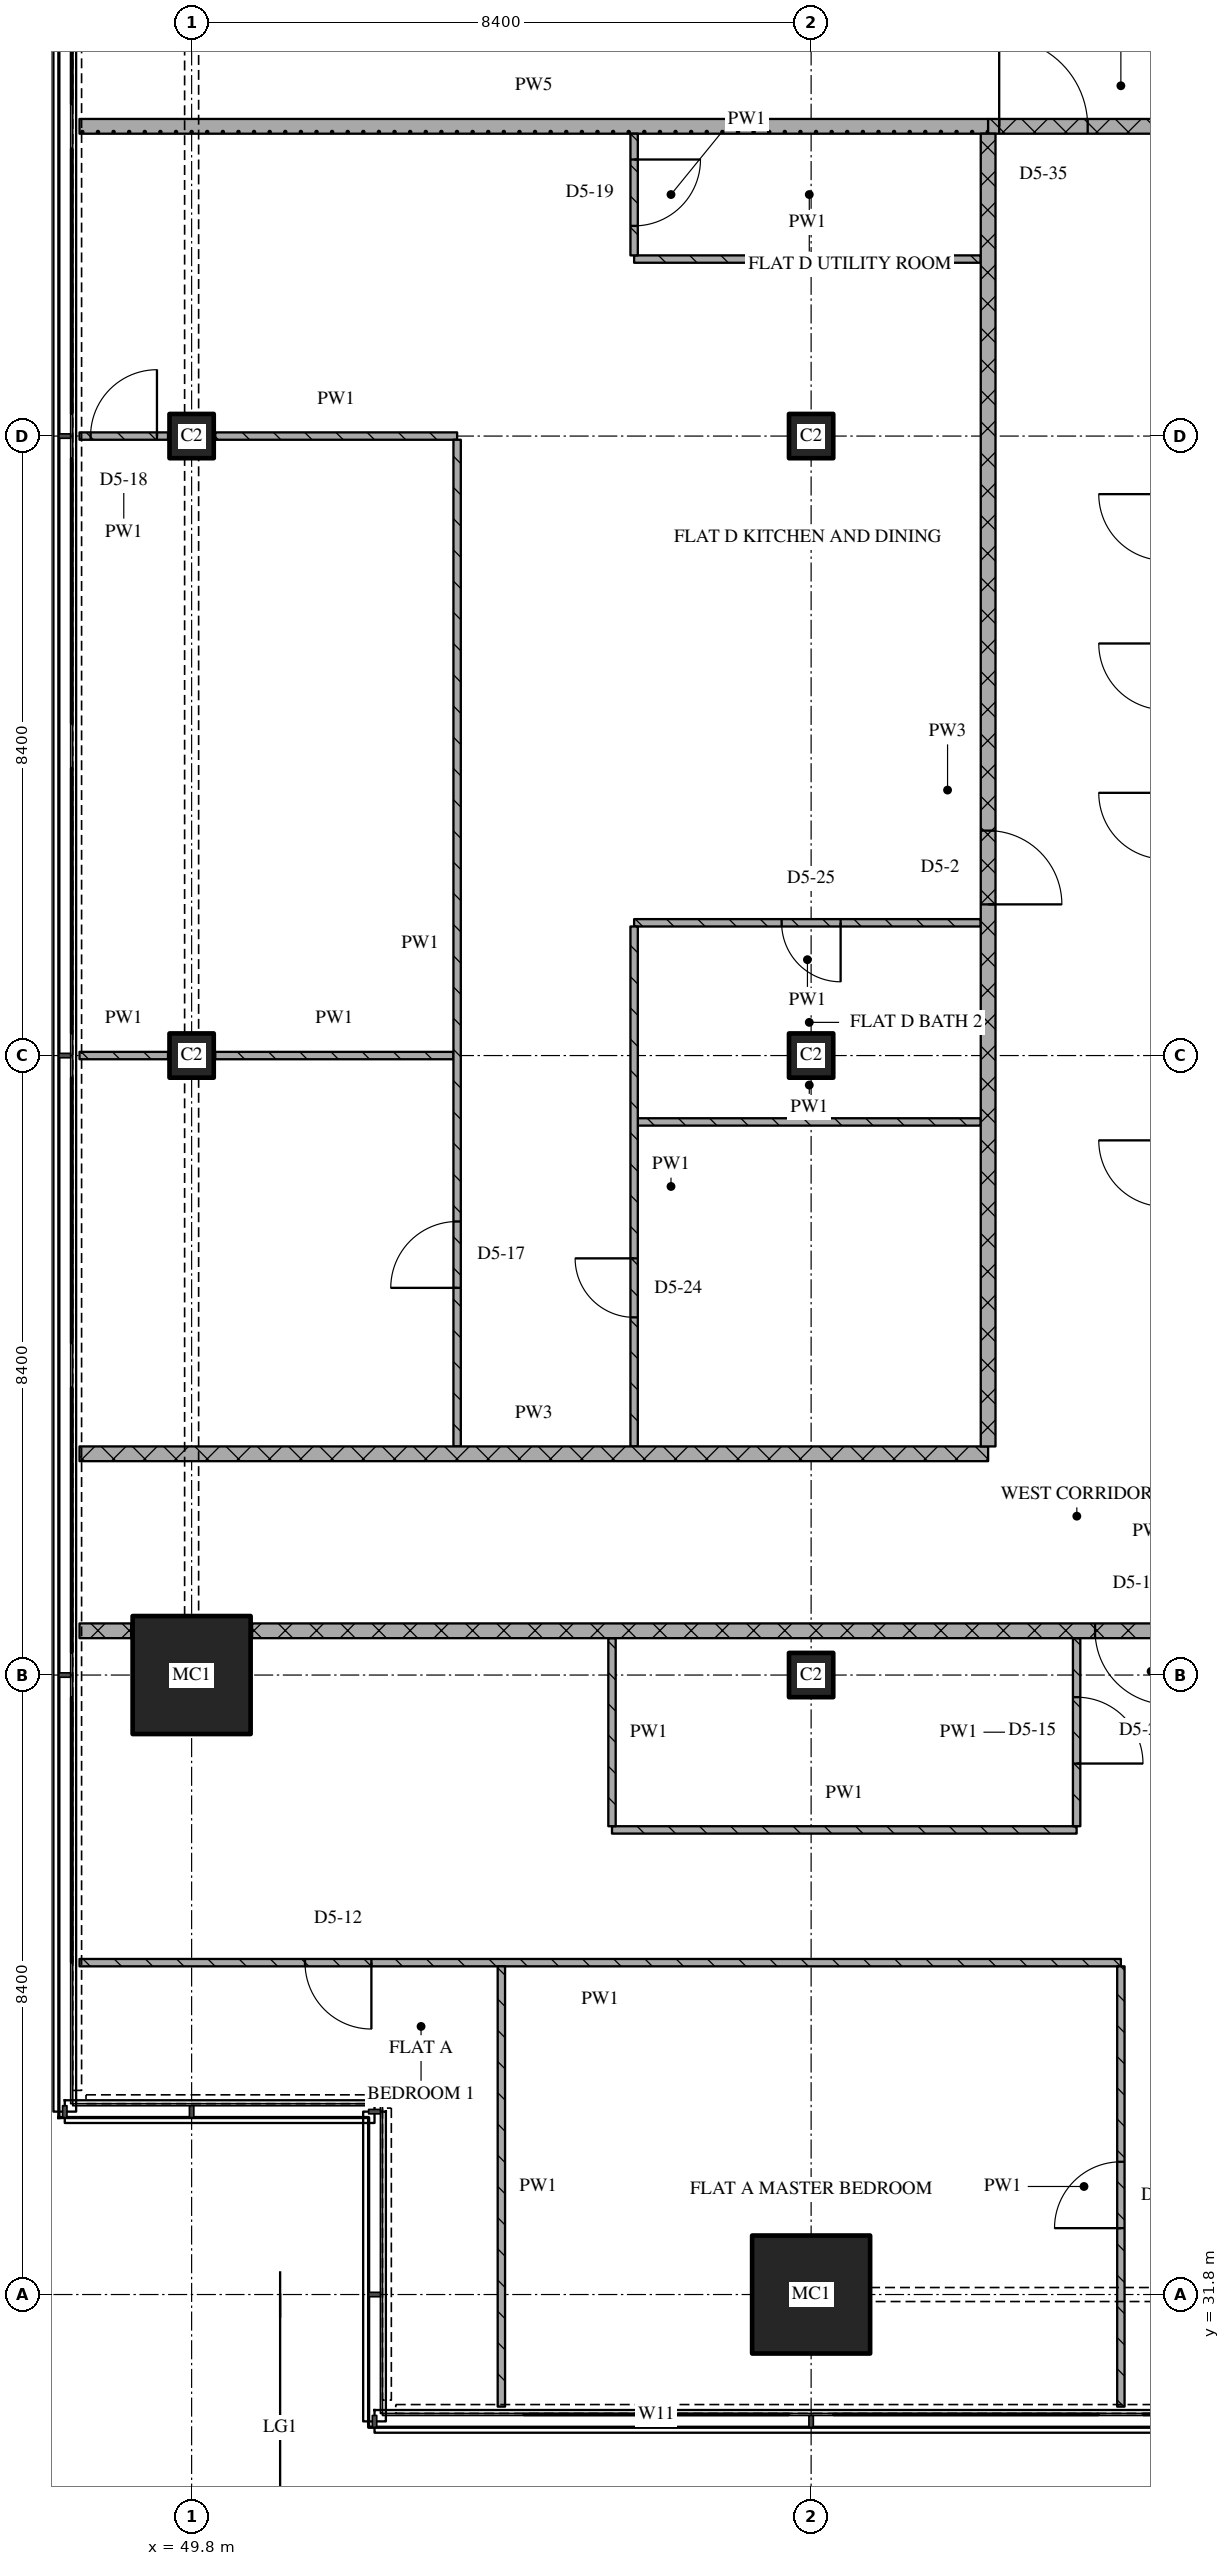
"""IFC4 building model, lengths in metres.
Left out: names, types, materials, properties, quantities, classifications, styles, units other than length and angle.
Written with IfcOpenShell. Run it as: python <this file> out.ifc"""

import sys

from ifc_helpers import new_model, si_unit, direction, frame, frame_2d, origin, origin_2d, place, context, subcontext, project, spatial, rectangle, extrude, element, fill, save


model = new_model("IFC4")
c1 = context("Model", 3, precision=1e-05, world=origin(), true_north=direction((0.0, 1.0)))
c2 = subcontext(c1, "Body", "Model", "MODEL_VIEW")
j1 = project(units=[si_unit("LENGTHUNIT", "METRE"), si_unit("PLANEANGLEUNIT", "RADIAN")], contexts=[c1])
p1 = place(None, origin())
s1 = spatial("IfcSite", under=j1, at=p1, CompositionType="ELEMENT")
p2 = place(p1, origin())
s2 = spatial("IfcBuilding", under=s1, at=p2, CompositionType="ELEMENT")
p3 = place(p2, frame((0.0, 0.0, 248.7)))
s3 = spatial("IfcBuildingStorey", under=s2, at=p3, CompositionType="ELEMENT", Elevation=248.7)
p4 = place(p3, frame((49.8, 40.2, 0.0), z_axis=(0.0, 0.0, 1.0), x_axis=(1.0, 0.0, 0.0)))
e1 = element("IfcColumn", 1, at=p4, inside=s3, PredefinedType="COLUMN", context=c2, shape_type="SweptSolid", body=[
    extrude(rectangle(XDim=1.6, YDim=1.6, at=origin_2d()), origin(), (0.0, 0.0, 1.0), 3.6),
])
for number, where, z_axis, x_axis in (
    (2, (49.8, 48.6, 0.0), (0.0, 0.0, 1.0), (1.0, 0.0, 0.0)),
    (3, (49.8, 57.0, 0.0), (0.0, 0.0, 1.0), (1.0, 0.0, 0.0)),
):
    element("IfcColumn", number, at=place(p3, frame(where, z_axis=z_axis, x_axis=x_axis)), inside=s3, PredefinedType="COLUMN", context=c2, shape_type="SweptSolid", body=[
        extrude(rectangle(XDim=0.6, YDim=0.6, at=origin_2d()), origin(), (0.0, 0.0, 1.0), 3.6),
    ])
p5 = place(p3, frame((58.2, 31.8, 0.0), z_axis=(0.0, 0.0, 1.0), x_axis=(1.0, 0.0, 0.0)))
e4 = element("IfcColumn", 4, at=p5, inside=s3, PredefinedType="COLUMN", context=c2, shape_type="SweptSolid", body=[
    extrude(rectangle(XDim=1.6, YDim=1.6, at=origin_2d()), origin(), (0.0, 0.0, 1.0), 3.6),
])
for number, where, z_axis, x_axis in (
    (5, (58.2, 40.2, 0.0), (0.0, 0.0, 1.0), (1.0, 0.0, 0.0)),
    (6, (58.2, 48.6, 0.0), (0.0, 0.0, 1.0), (1.0, 0.0, 0.0)),
    (7, (58.2, 57.0, 0.0), (0.0, 0.0, 1.0), (1.0, 0.0, 0.0)),
):
    element("IfcColumn", number, at=place(p3, frame(where, z_axis=z_axis, x_axis=x_axis)), inside=s3, PredefinedType="COLUMN", context=c2, shape_type="SweptSolid", body=[
        extrude(rectangle(XDim=0.6, YDim=0.6, at=origin_2d()), origin(), (0.0, 0.0, 1.0), 3.6),
    ])
p6 = place(p3, frame((62.4, 36.3, 0.0), z_axis=(0.0, 0.0, 1.0), x_axis=(-1.0, 0.0, 0.0)))
e8 = element("IfcWall", 8, at=p6, inside=s3, PredefinedType="PARTITIONING", context=c2, shape_type="SweptSolid", body=[
    extrude(rectangle(XDim=14.12, YDim=0.1, at=frame_2d((7.06, 0.0))), origin(), (0.0, 0.0, 1.0), 3.3),
])
p7 = place(p6, frame((10.163, 0.0, 0.0)))
e9 = element("IfcOpeningElement", 9, at=p7, cuts=e8, PredefinedType="OPENING", context=c2, shape_type="SweptSolid", body=[
    extrude(rectangle(XDim=0.9, YDim=2.1, at=frame_2d((0.45, 1.05))), frame((0.0, 0.06, 0.0), z_axis=(0.0, -1.0, 0.0), x_axis=(1.0, 0.0, 0.0)), (0.0, 0.0, 1.0), 0.12),
])
p8 = place(p3, frame((55.5, 38.1, 0.0), z_axis=(0.0, 0.0, 1.0), x_axis=(1.0, 0.0, 0.0)))
e10 = element("IfcWall", 10, at=p8, inside=s3, PredefinedType="PARTITIONING", context=c2, shape_type="SweptSolid", body=[
    extrude(rectangle(XDim=6.3, YDim=0.1, at=frame_2d((3.15, 0.0))), origin(), (0.0, 0.0, 1.0), 3.3),
])
p9 = place(p3, frame((48.28, 40.8, 0.0), z_axis=(0.0, 0.0, 1.0), x_axis=(1.0, 0.0, 0.0)))
e11 = element("IfcWall", 11, at=p9, inside=s3, PredefinedType="PARTITIONING", context=c2, shape_type="SweptSolid", body=[
    extrude(rectangle(XDim=0.7, YDim=0.2, at=frame_2d((0.35, 0.0))), origin(), (0.0, 0.0, 1.0), 3.3),
])
p10 = place(p3, frame((75.0, 40.8, 0.0), z_axis=(0.0, 0.0, 1.0), x_axis=(-1.0, 0.0, 0.0)))
e12 = element("IfcWall", 12, at=p10, inside=s3, PredefinedType="PARTITIONING", context=c2, shape_type="SweptSolid", body=[
    extrude(rectangle(XDim=24.38, YDim=0.2, at=frame_2d((12.19, 0.0))), origin(), (0.0, 0.0, 1.0), 3.3),
])
p11 = place(p10, frame((11.95, 0.0, 0.0)))
e13 = element("IfcOpeningElement", 13, at=p11, cuts=e12, PredefinedType="OPENING", context=c2, shape_type="SweptSolid", body=[
    extrude(rectangle(XDim=1.0, YDim=2.1, at=frame_2d((0.5, 1.05))), frame((0.0, 0.11, 0.0), z_axis=(0.0, -1.0, 0.0), x_axis=(1.0, 0.0, 0.0)), (0.0, 0.0, 1.0), 0.22),
])
p12 = place(p3, frame((48.28, 43.2, 0.0), z_axis=(0.0, 0.0, 1.0), x_axis=(1.0, 0.0, 0.0)))
e14 = element("IfcWall", 14, at=p12, inside=s3, PredefinedType="PARTITIONING", context=c2, shape_type="SweptSolid", body=[
    extrude(rectangle(XDim=12.32, YDim=0.2, at=frame_2d((6.16, 0.0))), origin(), (0.0, 0.0, 1.0), 3.3),
])
p13 = place(p3, frame((55.85, 47.7, 0.0), z_axis=(0.0, 0.0, 1.0), x_axis=(1.0, 0.0, 0.0)))
e15 = element("IfcWall", 15, at=p13, inside=s3, PredefinedType="PARTITIONING", context=c2, shape_type="SweptSolid", body=[
    extrude(rectangle(XDim=4.65, YDim=0.1, at=frame_2d((2.325, 0.0))), origin(), (0.0, 0.0, 1.0), 3.3),
])
p14 = place(p3, frame((48.28, 48.6, 0.0), z_axis=(0.0, 0.0, 1.0), x_axis=(1.0, 0.0, 0.0)))
e16 = element("IfcWall", 16, at=p14, inside=s3, PredefinedType="PARTITIONING", context=c2, shape_type="SweptSolid", body=[
    extrude(rectangle(XDim=1.2, YDim=0.1, at=frame_2d((0.6, 0.0))), origin(), (0.0, 0.0, 1.0), 3.3),
])
p15 = place(p3, frame((50.12, 48.6, 0.0), z_axis=(0.0, 0.0, 1.0), x_axis=(1.0, 0.0, 0.0)))
e17 = element("IfcWall", 17, at=p15, inside=s3, PredefinedType="PARTITIONING", context=c2, shape_type="SweptSolid", body=[
    extrude(rectangle(XDim=3.23, YDim=0.1, at=frame_2d((1.615, 0.0))), origin(), (0.0, 0.0, 1.0), 3.3),
])
p16 = place(p3, frame((60.5, 50.4, 0.0), z_axis=(0.0, 0.0, 1.0), x_axis=(-1.0, 0.0, 0.0)))
e18 = element("IfcWall", 18, at=p16, inside=s3, PredefinedType="PARTITIONING", context=c2, shape_type="SweptSolid", body=[
    extrude(rectangle(XDim=4.7, YDim=0.1, at=frame_2d((2.35, 0.0))), origin(), (0.0, 0.0, 1.0), 3.3),
])
p17 = place(p16, frame((1.9, 0.0, 0.0)))
e19 = element("IfcOpeningElement", 19, at=p17, cuts=e18, PredefinedType="OPENING", context=c2, shape_type="SweptSolid", body=[
    extrude(rectangle(XDim=0.8, YDim=2.1, at=frame_2d((0.4, 1.05))), frame((0.0, 0.06, 0.0), z_axis=(0.0, -1.0, 0.0), x_axis=(1.0, 0.0, 0.0)), (0.0, 0.0, 1.0), 0.12),
])
p18 = place(p3, frame((49.48, 57.0, 0.0), z_axis=(0.0, 0.0, 1.0), x_axis=(-1.0, 0.0, 0.0)))
e20 = element("IfcWall", 20, at=p18, inside=s3, PredefinedType="PARTITIONING", context=c2, shape_type="SweptSolid", body=[
    extrude(rectangle(XDim=1.2, YDim=0.1, at=frame_2d((0.6, 0.0))), origin(), (0.0, 0.0, 1.0), 3.3),
])
p19 = place(p18, frame((0.15, 0.0, 0.0)))
e21 = element("IfcOpeningElement", 21, at=p19, cuts=e20, PredefinedType="OPENING", context=c2, shape_type="SweptSolid", body=[
    extrude(rectangle(XDim=0.9, YDim=2.1, at=frame_2d((0.45, 1.05))), frame((0.0, 0.06, 0.0), z_axis=(0.0, -1.0, 0.0), x_axis=(1.0, 0.0, 0.0)), (0.0, 0.0, 1.0), 0.12),
])
p20 = place(p3, frame((50.12, 57.0, 0.0), z_axis=(0.0, 0.0, 1.0), x_axis=(1.0, 0.0, 0.0)))
e22 = element("IfcWall", 22, at=p20, inside=s3, PredefinedType="PARTITIONING", context=c2, shape_type="SweptSolid", body=[
    extrude(rectangle(XDim=3.28, YDim=0.1, at=frame_2d((1.64, 0.0))), origin(), (0.0, 0.0, 1.0), 3.3),
])
p21 = place(p3, frame((55.8, 59.4, 0.0), z_axis=(0.0, 0.0, 1.0), x_axis=(1.0, 0.0, 0.0)))
e23 = element("IfcWall", 23, at=p21, inside=s3, PredefinedType="PARTITIONING", context=c2, shape_type="SweptSolid", body=[
    extrude(rectangle(XDim=4.7, YDim=0.1, at=frame_2d((2.35, 0.0))), origin(), (0.0, 0.0, 1.0), 3.3),
])
p22 = place(p3, frame((60.6, 61.2, 0.0), z_axis=(0.0, 0.0, 1.0), x_axis=(1.0, 0.0, 0.0)))
e24 = element("IfcWall", 24, at=p22, inside=s3, PredefinedType="PARTITIONING", context=c2, shape_type="SweptSolid", body=[
    extrude(rectangle(XDim=3.6, YDim=0.2, at=frame_2d((1.8, 0.0))), origin(), (0.0, 0.0, 1.0), 3.3),
])
p23 = place(p22, frame((0.15, 0.0, 0.0)))
e25 = element("IfcOpeningElement", 25, at=p23, cuts=e24, PredefinedType="OPENING", context=c2, shape_type="SweptSolid", body=[
    extrude(rectangle(XDim=1.2, YDim=2.1, at=frame_2d((0.6, 1.05))), frame((0.0, 0.11, 0.0), z_axis=(0.0, -1.0, 0.0), x_axis=(1.0, 0.0, 0.0)), (0.0, 0.0, 1.0), 0.22),
])
p24 = place(p3, frame((48.28, 61.2, 0.0), z_axis=(0.0, 0.0, 1.0), x_axis=(1.0, 0.0, 0.0)))
e26 = element("IfcWall", 26, at=p24, inside=s3, PredefinedType="PARTITIONING", context=c2, shape_type="SweptSolid", body=[
    extrude(rectangle(XDim=12.32, YDim=0.2, at=frame_2d((6.16, 0.0))), origin(), (0.0, 0.0, 1.0), 3.3),
])
p25 = place(p3, frame((53.4, 43.3, 0.0), z_axis=(0.0, 0.0, 1.0), x_axis=(0.0, 1.0, 0.0)))
e27 = element("IfcWall", 27, at=p25, inside=s3, PredefinedType="PARTITIONING", context=c2, shape_type="SweptSolid", body=[
    extrude(rectangle(XDim=13.65, YDim=0.1, at=frame_2d((6.825, 0.0))), origin(), (0.0, 0.0, 1.0), 3.3),
])
p26 = place(p25, frame((2.15, 0.0, 0.0)))
e28 = element("IfcOpeningElement", 28, at=p26, cuts=e27, PredefinedType="OPENING", context=c2, shape_type="SweptSolid", body=[
    extrude(rectangle(XDim=0.9, YDim=2.1, at=frame_2d((0.45, 1.05))), frame((0.0, 0.06, 0.0), z_axis=(0.0, -1.0, 0.0), x_axis=(1.0, 0.0, 0.0)), (0.0, 0.0, 1.0), 0.12),
])
p27 = place(p3, frame((54.0, 36.25, 0.0), z_axis=(0.0, 0.0, 1.0), x_axis=(0.0, -1.0, 0.0)))
e29 = element("IfcWall", 29, at=p27, inside=s3, PredefinedType="PARTITIONING", context=c2, shape_type="SweptSolid", body=[
    extrude(rectangle(XDim=5.97, YDim=0.1, at=frame_2d((2.985, 0.0))), origin(), (0.0, 0.0, 1.0), 3.3),
])
p28 = place(p3, frame((55.5, 40.7, 0.0), z_axis=(0.0, 0.0, 1.0), x_axis=(0.0, -1.0, 0.0)))
e30 = element("IfcWall", 30, at=p28, inside=s3, PredefinedType="PARTITIONING", context=c2, shape_type="SweptSolid", body=[
    extrude(rectangle(XDim=2.55, YDim=0.1, at=frame_2d((1.275, 0.0))), origin(), (0.0, 0.0, 1.0), 3.3),
])
p29 = place(p3, frame((55.8, 50.35, 0.0), z_axis=(0.0, 0.0, 1.0), x_axis=(0.0, -1.0, 0.0)))
e31 = element("IfcWall", 31, at=p29, inside=s3, PredefinedType="PARTITIONING", context=c2, shape_type="SweptSolid", body=[
    extrude(rectangle(XDim=7.05, YDim=0.1, at=frame_2d((3.525, 0.0))), origin(), (0.0, 0.0, 1.0), 3.3),
])
p30 = place(p29, frame((4.5, 0.0, 0.0)))
e32 = element("IfcOpeningElement", 32, at=p30, cuts=e31, PredefinedType="OPENING", context=c2, shape_type="SweptSolid", body=[
    extrude(rectangle(XDim=0.8, YDim=2.1, at=frame_2d((0.4, 1.05))), frame((0.0, 0.06, 0.0), z_axis=(0.0, -1.0, 0.0), x_axis=(1.0, 0.0, 0.0)), (0.0, 0.0, 1.0), 0.12),
])
p31 = place(p3, frame((55.8, 61.1, 0.0), z_axis=(0.0, 0.0, 1.0), x_axis=(0.0, -1.0, 0.0)))
e33 = element("IfcWall", 33, at=p31, inside=s3, PredefinedType="PARTITIONING", context=c2, shape_type="SweptSolid", body=[
    extrude(rectangle(XDim=1.65, YDim=0.1, at=frame_2d((0.825, 0.0))), origin(), (0.0, 0.0, 1.0), 3.3),
])
p32 = place(p31, frame((0.35, 0.0, 0.0)))
e34 = element("IfcOpeningElement", 34, at=p32, cuts=e33, PredefinedType="OPENING", context=c2, shape_type="SweptSolid", body=[
    extrude(rectangle(XDim=0.9, YDim=2.1, at=frame_2d((0.45, 1.05))), frame((0.0, 0.06, 0.0), z_axis=(0.0, -1.0, 0.0), x_axis=(1.0, 0.0, 0.0)), (0.0, 0.0, 1.0), 0.12),
])
p33 = place(p3, frame((60.6, 43.3, 0.0), z_axis=(0.0, 0.0, 1.0), x_axis=(0.0, 1.0, 0.0)))
e35 = element("IfcWall", 35, at=p33, inside=s3, PredefinedType="PARTITIONING", context=c2, shape_type="SweptSolid", body=[
    extrude(rectangle(XDim=17.8, YDim=0.2, at=frame_2d((8.9, 0.0))), origin(), (0.0, 0.0, 1.0), 3.3),
])
p34 = place(p33, frame((7.35, 0.0, 0.0)))
e36 = element("IfcOpeningElement", 36, at=p34, cuts=e35, PredefinedType="OPENING", context=c2, shape_type="SweptSolid", body=[
    extrude(rectangle(XDim=1.0, YDim=2.1, at=frame_2d((0.5, 1.05))), frame((0.0, 0.11, 0.0), z_axis=(0.0, -1.0, 0.0), x_axis=(1.0, 0.0, 0.0)), (0.0, 0.0, 1.0), 0.22),
])
p35 = place(p3, frame((61.8, 38.15, 0.0), z_axis=(0.0, 0.0, 1.0), x_axis=(0.0, 1.0, 0.0)))
e37 = element("IfcWall", 37, at=p35, inside=s3, PredefinedType="PARTITIONING", context=c2, shape_type="SweptSolid", body=[
    extrude(rectangle(XDim=2.55, YDim=0.1, at=frame_2d((1.275, 0.0))), origin(), (0.0, 0.0, 1.0), 3.3),
])
p36 = place(p35, frame((0.85, 0.0, 0.0)))
e38 = element("IfcOpeningElement", 38, at=p36, cuts=e37, PredefinedType="OPENING", context=c2, shape_type="SweptSolid", body=[
    extrude(rectangle(XDim=0.9, YDim=2.1, at=frame_2d((0.45, 1.05))), frame((0.0, 0.06, 0.0), z_axis=(0.0, -1.0, 0.0), x_axis=(1.0, 0.0, 0.0)), (0.0, 0.0, 1.0), 0.12),
])
p37 = place(p3, frame((62.4, 30.28, 0.0), z_axis=(0.0, 0.0, 1.0), x_axis=(0.0, 1.0, 0.0)))
e39 = element("IfcWall", 39, at=p37, inside=s3, PredefinedType="PARTITIONING", context=c2, shape_type="SweptSolid", body=[
    extrude(rectangle(XDim=5.97, YDim=0.1, at=frame_2d((2.985, 0.0))), origin(), (0.0, 0.0, 1.0), 3.3),
])
p38 = place(p37, frame((2.42, 0.0, 0.0)))
e40 = element("IfcOpeningElement", 40, at=p38, cuts=e39, PredefinedType="OPENING", context=c2, shape_type="SweptSolid", body=[
    extrude(rectangle(XDim=0.9, YDim=2.1, at=frame_2d((0.45, 1.05))), frame((0.0, 0.06, 0.0), z_axis=(0.0, -1.0, 0.0), x_axis=(1.0, 0.0, 0.0)), (0.0, 0.0, 1.0), 0.12),
])
p39 = place(p7, origin())
e41 = element("IfcDoor", 41, at=p39, inside=s3, OperationType="SINGLE_SWING_LEFT", PredefinedType="DOOR", context=c2, shape_type="SweptSolid", body=[
    extrude(rectangle(XDim=0.9, YDim=2.1, at=frame_2d((0.45, 1.05))), frame((0.0, 0.025, 0.0), z_axis=(0.0, -1.0, 0.0), x_axis=(1.0, 0.0, 0.0)), (0.0, 0.0, 1.0), 0.05),
])
fill(e9, e41)
p40 = place(p11, origin())
e42 = element("IfcDoor", 42, at=p40, inside=s3, OperationType="SINGLE_SWING_LEFT", PredefinedType="DOOR", context=c2, shape_type="SweptSolid", body=[
    extrude(rectangle(XDim=1.0, YDim=2.1, at=frame_2d((0.5, 1.05))), frame((0.0, 0.025, 0.0), z_axis=(0.0, -1.0, 0.0), x_axis=(1.0, 0.0, 0.0)), (0.0, 0.0, 1.0), 0.05),
])
fill(e13, e42)
p41 = place(p17, origin())
e43 = element("IfcDoor", 43, at=p41, inside=s3, OperationType="SINGLE_SWING_LEFT", PredefinedType="DOOR", context=c2, shape_type="SweptSolid", body=[
    extrude(rectangle(XDim=0.8, YDim=2.1, at=frame_2d((0.4, 1.05))), frame((0.0, 0.025, 0.0), z_axis=(0.0, -1.0, 0.0), x_axis=(1.0, 0.0, 0.0)), (0.0, 0.0, 1.0), 0.05),
])
fill(e19, e43)
p42 = place(p19, origin())
e44 = element("IfcDoor", 44, at=p42, inside=s3, OperationType="SINGLE_SWING_RIGHT", PredefinedType="DOOR", context=c2, shape_type="SweptSolid", body=[
    extrude(rectangle(XDim=0.9, YDim=2.1, at=frame_2d((0.45, 1.05))), frame((0.0, 0.025, 0.0), z_axis=(0.0, -1.0, 0.0), x_axis=(1.0, 0.0, 0.0)), (0.0, 0.0, 1.0), 0.05),
])
fill(e21, e44)
p43 = place(p23, origin())
e45 = element("IfcDoor", 45, at=p43, inside=s3, OperationType="SINGLE_SWING_LEFT", PredefinedType="DOOR", context=c2, shape_type="SweptSolid", body=[
    extrude(rectangle(XDim=1.2, YDim=2.1, at=frame_2d((0.6, 1.05))), frame((0.0, 0.025, 0.0), z_axis=(0.0, -1.0, 0.0), x_axis=(1.0, 0.0, 0.0)), (0.0, 0.0, 1.0), 0.05),
])
fill(e25, e45)
p44 = place(p26, origin())
e46 = element("IfcDoor", 46, at=p44, inside=s3, OperationType="SINGLE_SWING_LEFT", PredefinedType="DOOR", context=c2, shape_type="SweptSolid", body=[
    extrude(rectangle(XDim=0.9, YDim=2.1, at=frame_2d((0.45, 1.05))), frame((0.0, 0.025, 0.0), z_axis=(0.0, -1.0, 0.0), x_axis=(1.0, 0.0, 0.0)), (0.0, 0.0, 1.0), 0.05),
])
fill(e28, e46)
p45 = place(p30, origin())
e47 = element("IfcDoor", 47, at=p45, inside=s3, OperationType="SINGLE_SWING_RIGHT", PredefinedType="DOOR", context=c2, shape_type="SweptSolid", body=[
    extrude(rectangle(XDim=0.8, YDim=2.1, at=frame_2d((0.4, 1.05))), frame((0.0, 0.025, 0.0), z_axis=(0.0, -1.0, 0.0), x_axis=(1.0, 0.0, 0.0)), (0.0, 0.0, 1.0), 0.05),
])
fill(e32, e47)
p46 = place(p32, origin())
e48 = element("IfcDoor", 48, at=p46, inside=s3, OperationType="SINGLE_SWING_LEFT", PredefinedType="DOOR", context=c2, shape_type="SweptSolid", body=[
    extrude(rectangle(XDim=0.9, YDim=2.1, at=frame_2d((0.45, 1.05))), frame((0.0, 0.025, 0.0), z_axis=(0.0, -1.0, 0.0), x_axis=(1.0, 0.0, 0.0)), (0.0, 0.0, 1.0), 0.05),
])
fill(e34, e48)
p47 = place(p34, origin())
e49 = element("IfcDoor", 49, at=p47, inside=s3, OperationType="SINGLE_SWING_RIGHT", PredefinedType="DOOR", context=c2, shape_type="SweptSolid", body=[
    extrude(rectangle(XDim=1.0, YDim=2.1, at=frame_2d((0.5, 1.05))), frame((0.0, 0.025, 0.0), z_axis=(0.0, -1.0, 0.0), x_axis=(1.0, 0.0, 0.0)), (0.0, 0.0, 1.0), 0.05),
])
fill(e36, e49)
p48 = place(p36, origin())
e50 = element("IfcDoor", 50, at=p48, inside=s3, OperationType="SINGLE_SWING_RIGHT", PredefinedType="DOOR", context=c2, shape_type="SweptSolid", body=[
    extrude(rectangle(XDim=0.9, YDim=2.1, at=frame_2d((0.45, 1.05))), frame((0.0, 0.025, 0.0), z_axis=(0.0, -1.0, 0.0), x_axis=(1.0, 0.0, 0.0)), (0.0, 0.0, 1.0), 0.05),
])
fill(e38, e50)
p49 = place(p38, origin())
e51 = element("IfcDoor", 51, at=p49, inside=s3, OperationType="SINGLE_SWING_LEFT", PredefinedType="DOOR", context=c2, shape_type="SweptSolid", body=[
    extrude(rectangle(XDim=0.9, YDim=2.1, at=frame_2d((0.45, 1.05))), frame((0.0, 0.025, 0.0), z_axis=(0.0, -1.0, 0.0), x_axis=(1.0, 0.0, 0.0)), (0.0, 0.0, 1.0), 0.05),
])
fill(e40, e51)
save(model, sys.argv[1])
